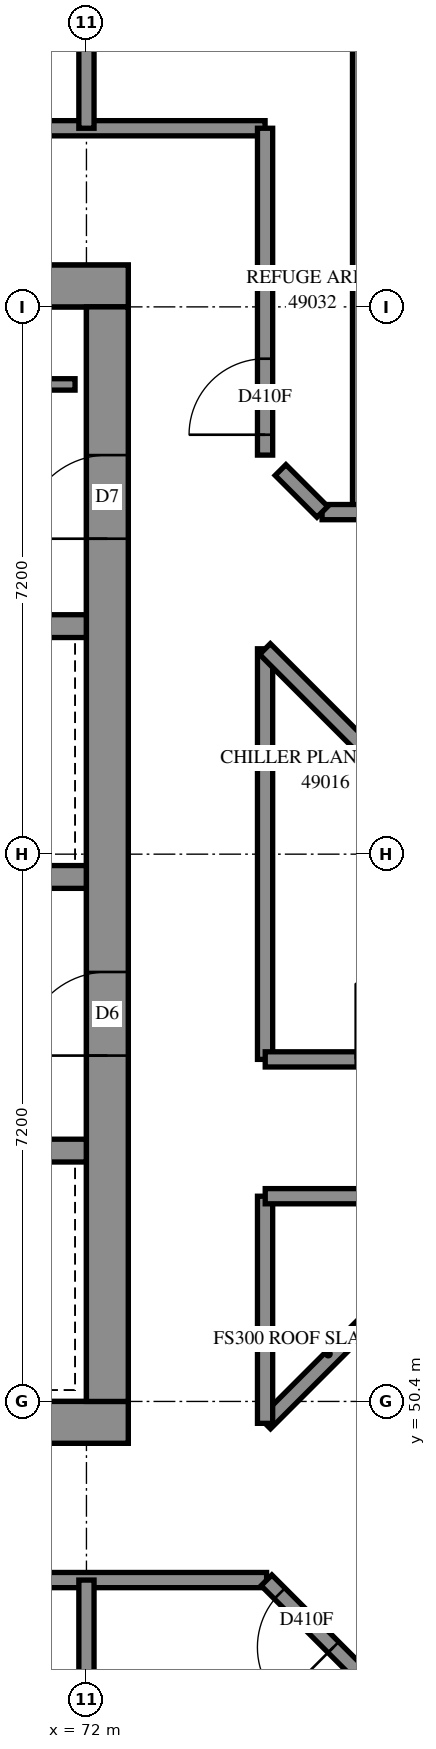
"""IFC4 building model, lengths in metres.
Left out: names, types, materials, properties, quantities, classifications, styles, units other than length and angle.
Written with IfcOpenShell. Run it as: python <this file> out.ifc"""

import sys

from ifc_helpers import new_model, si_unit, direction, frame, frame_2d, origin, place, context, subcontext, project, spatial, rectangle, extrude, element, fill, save


model = new_model("IFC4")
c1 = context("Model", 3, precision=1e-05, world=origin(), true_north=direction((0.0, 1.0)))
c2 = subcontext(c1, "Body", "Model", "MODEL_VIEW")
j1 = project(units=[si_unit("LENGTHUNIT", "METRE"), si_unit("PLANEANGLEUNIT", "RADIAN")], contexts=[c1])
p1 = place(None, origin())
s1 = spatial("IfcSite", under=j1, at=p1, CompositionType="ELEMENT")
p2 = place(p1, origin())
s2 = spatial("IfcBuilding", under=s1, at=p2, CompositionType="ELEMENT")
p3 = place(p2, frame((0.0, 0.0, 180.4)))
s3 = spatial("IfcBuildingStorey", under=s2, at=p3, CompositionType="ELEMENT", Elevation=180.4)
p4 = place(p3, frame((57.05, 50.125, -0.3), z_axis=(0.0, 0.0, 1.0), x_axis=(1.0, 0.0, 0.0)))
e1 = element("IfcWall", 1, at=p4, inside=s3, PredefinedType="SHEAR", context=c2, shape_type="SweptSolid", body=[
    extrude(rectangle(XDim=15.5, YDim=0.55, at=frame_2d((7.75, 0.0))), origin(), (0.0, 0.0, 1.0), 4.3),
])
p5 = place(p3, frame((57.05, 65.075, -0.3), z_axis=(0.0, 0.0, 1.0), x_axis=(1.0, 0.0, 0.0)))
e2 = element("IfcWall", 2, at=p5, inside=s3, PredefinedType="SHEAR", context=c2, shape_type="SweptSolid", body=[
    extrude(rectangle(XDim=15.5, YDim=0.55, at=frame_2d((7.75, 0.0))), origin(), (0.0, 0.0, 1.0), 4.3),
])
p6 = place(p5, frame((10.55, 0.0, 0.3)))
e3 = element("IfcOpeningElement", 3, at=p6, cuts=e2, PredefinedType="OPENING", context=c2, shape_type="SweptSolid", body=[
    extrude(rectangle(XDim=0.8, YDim=2.1, at=frame_2d((0.4, 1.05))), frame((0.0, 0.285, 0.0), z_axis=(0.0, -1.0, 0.0), x_axis=(1.0, 0.0, 0.0)), (0.0, 0.0, 1.0), 0.57),
])
p7 = place(p3, frame((72.275, 50.4, -0.3), z_axis=(0.0, 0.0, 1.0), x_axis=(0.0, 1.0, 0.0)))
e4 = element("IfcWall", 4, at=p7, inside=s3, PredefinedType="SHEAR", context=c2, shape_type="SweptSolid", body=[
    extrude(rectangle(XDim=14.4, YDim=0.55, at=frame_2d((7.2, 0.0))), origin(), (0.0, 0.0, 1.0), 4.3),
])
p8 = place(p7, frame((4.55, 0.0, 0.3)))
e5 = element("IfcOpeningElement", 5, at=p8, cuts=e4, PredefinedType="OPENING", context=c2, shape_type="SweptSolid", body=[
    extrude(rectangle(XDim=1.1, YDim=2.1, at=frame_2d((0.55, 1.05))), frame((0.0, 0.285, 0.0), z_axis=(0.0, -1.0, 0.0), x_axis=(1.0, 0.0, 0.0)), (0.0, 0.0, 1.0), 0.57),
])
p9 = place(p7, frame((11.35, 0.0, 0.3)))
e6 = element("IfcOpeningElement", 6, at=p9, cuts=e4, PredefinedType="OPENING", context=c2, shape_type="SweptSolid", body=[
    extrude(rectangle(XDim=1.1, YDim=2.1, at=frame_2d((0.55, 1.05))), frame((0.0, 0.285, 0.0), z_axis=(0.0, -1.0, 0.0), x_axis=(1.0, 0.0, 0.0)), (0.0, 0.0, 1.0), 0.57),
])
p10 = place(p3, frame((57.6, 53.7, 0.0), z_axis=(0.0, 0.0, 1.0), x_axis=(1.0, 0.0, 0.0)))
e7 = element("IfcWall", 7, at=p10, inside=s3, PredefinedType="SOLIDWALL", context=c2, shape_type="SweptSolid", body=[
    extrude(rectangle(XDim=14.4, YDim=0.3, at=frame_2d((7.2, 0.0))), origin(), (0.0, 0.0, 1.0), 4.7),
])
p11 = place(p10, frame((1.35, 0.0, 0.0)))
e8 = element("IfcOpeningElement", 8, at=p11, cuts=e7, PredefinedType="OPENING", context=c2, shape_type="SweptSolid", body=[
    extrude(rectangle(XDim=0.9, YDim=2.1, at=frame_2d((0.45, 1.05))), frame((0.0, 0.16, 0.0), z_axis=(0.0, -1.0, 0.0), x_axis=(1.0, 0.0, 0.0)), (0.0, 0.0, 1.0), 0.32),
])
p12 = place(p10, frame((4.95, 0.0, 0.0)))
e9 = element("IfcOpeningElement", 9, at=p12, cuts=e7, PredefinedType="OPENING", context=c2, shape_type="SweptSolid", body=[
    extrude(rectangle(XDim=0.9, YDim=2.1, at=frame_2d((0.45, 1.05))), frame((0.0, 0.16, 0.0), z_axis=(0.0, -1.0, 0.0), x_axis=(1.0, 0.0, 0.0)), (0.0, 0.0, 1.0), 0.32),
])
p13 = place(p10, frame((8.55, 0.0, 0.0)))
e10 = element("IfcOpeningElement", 10, at=p13, cuts=e7, PredefinedType="OPENING", context=c2, shape_type="SweptSolid", body=[
    extrude(rectangle(XDim=0.9, YDim=2.1, at=frame_2d((0.45, 1.05))), frame((0.0, 0.16, 0.0), z_axis=(0.0, -1.0, 0.0), x_axis=(1.0, 0.0, 0.0)), (0.0, 0.0, 1.0), 0.32),
])
p14 = place(p10, frame((12.05, 0.0, 0.0)))
e11 = element("IfcOpeningElement", 11, at=p14, cuts=e7, PredefinedType="OPENING", context=c2, shape_type="SweptSolid", body=[
    extrude(rectangle(XDim=1.1, YDim=2.1, at=frame_2d((0.55, 1.05))), frame((0.0, 0.16, 0.0), z_axis=(0.0, -1.0, 0.0), x_axis=(1.0, 0.0, 0.0)), (0.0, 0.0, 1.0), 0.32),
])
p15 = place(p3, frame((57.6, 57.3, 0.0), z_axis=(0.0, 0.0, 1.0), x_axis=(1.0, 0.0, 0.0)))
e12 = element("IfcWall", 12, at=p15, inside=s3, PredefinedType="SOLIDWALL", context=c2, shape_type="SweptSolid", body=[
    extrude(rectangle(XDim=14.4, YDim=0.3, at=frame_2d((7.2, 0.0))), origin(), (0.0, 0.0, 1.0), 4.7),
])
p16 = place(p15, frame((1.25, 0.0, 0.0)))
e13 = element("IfcOpeningElement", 13, at=p16, cuts=e12, PredefinedType="OPENING", context=c2, shape_type="SweptSolid", body=[
    extrude(rectangle(XDim=1.1, YDim=2.1, at=frame_2d((0.55, 1.05))), frame((0.0, 0.16, 0.0), z_axis=(0.0, -1.0, 0.0), x_axis=(1.0, 0.0, 0.0)), (0.0, 0.0, 1.0), 0.32),
])
p17 = place(p15, frame((4.85, 0.0, 0.0)))
e14 = element("IfcOpeningElement", 14, at=p17, cuts=e12, PredefinedType="OPENING", context=c2, shape_type="SweptSolid", body=[
    extrude(rectangle(XDim=1.1, YDim=2.1, at=frame_2d((0.55, 1.05))), frame((0.0, 0.16, 0.0), z_axis=(0.0, -1.0, 0.0), x_axis=(1.0, 0.0, 0.0)), (0.0, 0.0, 1.0), 0.32),
])
p18 = place(p15, frame((8.45, 0.0, 0.0)))
e15 = element("IfcOpeningElement", 15, at=p18, cuts=e12, PredefinedType="OPENING", context=c2, shape_type="SweptSolid", body=[
    extrude(rectangle(XDim=1.1, YDim=2.1, at=frame_2d((0.55, 1.05))), frame((0.0, 0.16, 0.0), z_axis=(0.0, -1.0, 0.0), x_axis=(1.0, 0.0, 0.0)), (0.0, 0.0, 1.0), 0.32),
])
p19 = place(p15, frame((12.05, 0.0, 0.0)))
e16 = element("IfcOpeningElement", 16, at=p19, cuts=e12, PredefinedType="OPENING", context=c2, shape_type="SweptSolid", body=[
    extrude(rectangle(XDim=1.1, YDim=2.1, at=frame_2d((0.55, 1.05))), frame((0.0, 0.16, 0.0), z_axis=(0.0, -1.0, 0.0), x_axis=(1.0, 0.0, 0.0)), (0.0, 0.0, 1.0), 0.32),
])
p20 = place(p3, frame((64.8, 60.6, 0.0), z_axis=(0.0, 0.0, 1.0), x_axis=(1.0, 0.0, 0.0)))
e17 = element("IfcWall", 17, at=p20, inside=s3, PredefinedType="SOLIDWALL", context=c2, shape_type="SweptSolid", body=[
    extrude(rectangle(XDim=7.2, YDim=0.3, at=frame_2d((3.6, 0.0))), origin(), (0.0, 0.0, 1.0), 4.7),
])
p21 = place(p3, frame((64.95, 63.78, 0.0), z_axis=(0.0, 0.0, 1.0), x_axis=(1.0, 0.0, 0.0)))
e18 = element("IfcWall", 18, at=p21, inside=s3, PredefinedType="PARTITIONING", context=c2, shape_type="SweptSolid", body=[
    extrude(rectangle(XDim=6.9, YDim=0.15, at=frame_2d((3.45, 0.0))), origin(), (0.0, 0.0, 1.0), 4.7),
])
p22 = place(p3, frame((55.25, 48.05, 0.0), z_axis=(0.0, 0.0, 1.0), x_axis=(1.0, 0.0, 0.0)))
e19 = element("IfcWall", 19, at=p22, inside=s3, PredefinedType="PARTITIONING", context=c2, shape_type="SweptSolid", body=[
    extrude(rectangle(XDim=19.12, YDim=0.2, at=frame_2d((9.56, 0.0))), origin(), (0.0, 0.0, 1.0), 4.7),
])
p23 = place(p22, frame((4.383, 0.0, 0.0)))
e20 = element("IfcOpeningElement", 20, at=p23, cuts=e19, PredefinedType="OPENING", context=c2, shape_type="SweptSolid", body=[
    extrude(rectangle(XDim=1.0, YDim=2.1, at=frame_2d((0.5, 1.05))), frame((0.0, 0.11, 0.0), z_axis=(0.0, -1.0, 0.0), x_axis=(1.0, 0.0, 0.0)), (0.0, 0.0, 1.0), 0.22),
])
p24 = place(p22, frame((6.457, 0.0, 0.0)))
e21 = element("IfcOpeningElement", 21, at=p24, cuts=e19, PredefinedType="OPENING", context=c2, shape_type="SweptSolid", body=[
    extrude(rectangle(XDim=1.0, YDim=2.1, at=frame_2d((0.5, 1.05))), frame((0.0, 0.11, 0.0), z_axis=(0.0, -1.0, 0.0), x_axis=(1.0, 0.0, 0.0)), (0.0, 0.0, 1.0), 0.22),
])
p25 = place(p22, frame((11.582, 0.0, 0.0)))
e22 = element("IfcOpeningElement", 22, at=p25, cuts=e19, PredefinedType="OPENING", context=c2, shape_type="SweptSolid", body=[
    extrude(rectangle(XDim=1.0, YDim=2.1, at=frame_2d((0.5, 1.05))), frame((0.0, 0.11, 0.0), z_axis=(0.0, -1.0, 0.0), x_axis=(1.0, 0.0, 0.0)), (0.0, 0.0, 1.0), 0.22),
])
p26 = place(p22, frame((13.658, 0.0, 0.0)))
e23 = element("IfcOpeningElement", 23, at=p26, cuts=e19, PredefinedType="OPENING", context=c2, shape_type="SweptSolid", body=[
    extrude(rectangle(XDim=1.0, YDim=2.1, at=frame_2d((0.5, 1.05))), frame((0.0, 0.11, 0.0), z_axis=(0.0, -1.0, 0.0), x_axis=(1.0, 0.0, 0.0)), (0.0, 0.0, 1.0), 0.22),
])
p27 = place(p3, frame((55.25, 67.15, 0.0), z_axis=(0.0, 0.0, 1.0), x_axis=(1.0, 0.0, 0.0)))
e24 = element("IfcWall", 24, at=p27, inside=s3, PredefinedType="PARTITIONING", context=c2, shape_type="SweptSolid", body=[
    extrude(rectangle(XDim=19.1, YDim=0.2, at=frame_2d((9.55, 0.0))), origin(), (0.0, 0.0, 1.0), 4.7),
])
p28 = place(p27, frame((4.442, 0.0, 0.0)))
e25 = element("IfcOpeningElement", 25, at=p28, cuts=e24, PredefinedType="OPENING", context=c2, shape_type="SweptSolid", body=[
    extrude(rectangle(XDim=1.0, YDim=2.1, at=frame_2d((0.5, 1.05))), frame((0.0, 0.11, 0.0), z_axis=(0.0, -1.0, 0.0), x_axis=(1.0, 0.0, 0.0)), (0.0, 0.0, 1.0), 0.22),
])
p29 = place(p27, frame((6.518, 0.0, 0.0)))
e26 = element("IfcOpeningElement", 26, at=p29, cuts=e24, PredefinedType="OPENING", context=c2, shape_type="SweptSolid", body=[
    extrude(rectangle(XDim=1.0, YDim=2.1, at=frame_2d((0.5, 1.05))), frame((0.0, 0.11, 0.0), z_axis=(0.0, -1.0, 0.0), x_axis=(1.0, 0.0, 0.0)), (0.0, 0.0, 1.0), 0.22),
])
p30 = place(p27, frame((11.643, 0.0, 0.0)))
e27 = element("IfcOpeningElement", 27, at=p30, cuts=e24, PredefinedType="OPENING", context=c2, shape_type="SweptSolid", body=[
    extrude(rectangle(XDim=1.0, YDim=2.1, at=frame_2d((0.5, 1.05))), frame((0.0, 0.11, 0.0), z_axis=(0.0, -1.0, 0.0), x_axis=(1.0, 0.0, 0.0)), (0.0, 0.0, 1.0), 0.22),
])
p31 = place(p27, frame((13.717, 0.0, 0.0)))
e28 = element("IfcOpeningElement", 28, at=p31, cuts=e24, PredefinedType="OPENING", context=c2, shape_type="SweptSolid", body=[
    extrude(rectangle(XDim=1.0, YDim=2.1, at=frame_2d((0.5, 1.05))), frame((0.0, 0.11, 0.0), z_axis=(0.0, -1.0, 0.0), x_axis=(1.0, 0.0, 0.0)), (0.0, 0.0, 1.0), 0.22),
])
p32 = place(p3, frame((75.6, 62.1, 0.0), z_axis=(0.0, 0.0, 1.0), x_axis=(0.0, 1.0, 0.0)))
e29 = element("IfcWall", 29, at=p32, inside=s3, PredefinedType="PARTITIONING", context=c2, shape_type="SweptSolid", body=[
    extrude(rectangle(XDim=7.55, YDim=0.2, at=frame_2d((3.775, 0.0))), origin(), (0.0, 0.0, 1.0), 4.7),
])
p33 = place(p3, frame((74.35, 54.9, 0.0), z_axis=(0.0, 0.0, 1.0), x_axis=(0.0, 1.0, 0.0)))
e30 = element("IfcWall", 30, at=p33, inside=s3, PredefinedType="PARTITIONING", context=c2, shape_type="SweptSolid", body=[
    extrude(rectangle(XDim=5.402, YDim=0.2, at=frame_2d((2.701, 0.0))), origin(), (0.0, 0.0, 1.0), 4.7),
])
p34 = place(p3, frame((74.352, 54.9, 0.0), z_axis=(0.0, 0.0, 1.0), x_axis=(1.0, 0.0, 0.0)))
e31 = element("IfcWall", 31, at=p34, inside=s3, PredefinedType="PARTITIONING", context=c2, shape_type="SweptSolid", body=[
    extrude(rectangle(XDim=4.788, YDim=0.2, at=frame_2d((2.394, 0.0))), origin(), (0.0, 0.0, 1.0), 4.7),
])
p35 = place(p34, frame((1.19, 0.0, 0.0)))
e32 = element("IfcOpeningElement", 32, at=p35, cuts=e31, PredefinedType="OPENING", context=c2, shape_type="SweptSolid", body=[
    extrude(rectangle(XDim=1.0, YDim=2.1, at=frame_2d((0.5, 1.05))), frame((0.0, 0.11, 0.0), z_axis=(0.0, -1.0, 0.0), x_axis=(1.0, 0.0, 0.0)), (0.0, 0.0, 1.0), 0.22),
])
p36 = place(p3, frame((74.349, 60.299, 0.0), z_axis=(0.0, 0.0, 1.0), x_axis=(0.7071067812, -0.7071067812, 0.0)))
e33 = element("IfcWall", 33, at=p36, inside=s3, PredefinedType="PARTITIONING", context=c2, shape_type="SweptSolid", body=[
    extrude(rectangle(XDim=4.452, YDim=0.2, at=frame_2d((2.226, 0.0))), origin(), (0.0, 0.0, 1.0), 4.7),
])
p37 = place(p3, frame((74.35, 62.85, 0.0), z_axis=(0.0, 0.0, 1.0), x_axis=(0.0, 1.0, 0.0)))
e34 = element("IfcWall", 34, at=p37, inside=s3, PredefinedType="PARTITIONING", context=c2, shape_type="SweptSolid", body=[
    extrude(rectangle(XDim=4.3, YDim=0.2, at=frame_2d((2.15, 0.0))), origin(), (0.0, 0.0, 1.0), 4.7),
])
p38 = place(p37, frame((0.268, 0.0, 0.0)))
e35 = element("IfcOpeningElement", 35, at=p38, cuts=e34, PredefinedType="OPENING", context=c2, shape_type="SweptSolid", body=[
    extrude(rectangle(XDim=1.0, YDim=2.1, at=frame_2d((0.5, 1.05))), frame((0.0, 0.11, 0.0), z_axis=(0.0, -1.0, 0.0), x_axis=(1.0, 0.0, 0.0)), (0.0, 0.0, 1.0), 0.22),
])
p39 = place(p3, frame((74.351, 50.111, 0.0), z_axis=(0.0, 0.0, 1.0), x_axis=(0.7071067812, 0.7071067812, 0.0)))
e36 = element("IfcWall", 36, at=p39, inside=s3, PredefinedType="PARTITIONING", context=c2, shape_type="SweptSolid", body=[
    extrude(rectangle(XDim=4.226, YDim=0.2, at=frame_2d((2.113, 0.0))), origin(), (0.0, 0.0, 1.0), 4.7),
])
p40 = place(p3, frame((75.1, 62.1, 0.0), z_axis=(0.0, 0.0, 1.0), x_axis=(1.0, 0.0, 0.0)))
e37 = element("IfcWall", 37, at=p40, inside=s3, PredefinedType="PARTITIONING", context=c2, shape_type="SweptSolid", body=[
    extrude(rectangle(XDim=4.1, YDim=0.2, at=frame_2d((2.05, 0.0))), origin(), (0.0, 0.0, 1.0), 4.7),
])
p41 = place(p3, frame((76.864, 45.55, 0.0), z_axis=(0.0, 0.0, 1.0), x_axis=(-0.7069226259, 0.7072908885, 0.0)))
e38 = element("IfcWall", 38, at=p41, inside=s3, PredefinedType="PARTITIONING", context=c2, shape_type="SweptSolid", body=[
    extrude(rectangle(XDim=3.53, YDim=0.2, at=frame_2d((1.765, 0.0))), origin(), (0.0, 0.0, 1.0), 4.7),
])
p42 = place(p41, frame((2.285, 0.0, 0.0)))
e39 = element("IfcOpeningElement", 39, at=p42, cuts=e38, PredefinedType="OPENING", context=c2, shape_type="SweptSolid", body=[
    extrude(rectangle(XDim=1.0, YDim=2.1, at=frame_2d((0.5, 1.05))), frame((0.0, 0.11, 0.0), z_axis=(0.0, -1.0, 0.0), x_axis=(1.0, 0.0, 0.0)), (0.0, 0.0, 1.0), 0.22),
])
p43 = place(p3, frame((74.35, 50.112, 0.0), z_axis=(0.0, 0.0, 1.0), x_axis=(0.0, 1.0, 0.0)))
e40 = element("IfcWall", 40, at=p43, inside=s3, PredefinedType="PARTITIONING", context=c2, shape_type="SweptSolid", body=[
    extrude(rectangle(XDim=2.988, YDim=0.2, at=frame_2d((1.494, 0.0))), origin(), (0.0, 0.0, 1.0), 4.7),
])
p44 = place(p3, frame((74.352, 53.1, 0.0), z_axis=(0.0, 0.0, 1.0), x_axis=(1.0, 0.0, 0.0)))
e41 = element("IfcWall", 41, at=p44, inside=s3, PredefinedType="PARTITIONING", context=c2, shape_type="SweptSolid", body=[
    extrude(rectangle(XDim=2.986, YDim=0.2, at=frame_2d((1.493, 0.0))), origin(), (0.0, 0.0, 1.0), 4.7),
])
for number, where, z_axis, x_axis in (
    (42, (72.0, 45.55, 0.0), (0.0, 0.0, 1.0), (0.0, 1.0, 0.0)),
    (43, (72.0, 67.15, 0.0), (0.0, 0.0, 1.0), (0.0, 1.0, 0.0)),
):
    element("IfcWall", number, at=place(p3, frame(where, z_axis=z_axis, x_axis=x_axis)), inside=s3, PredefinedType="PARTITIONING", context=c2, shape_type="SweptSolid", body=[
        extrude(rectangle(XDim=2.5, YDim=0.2, at=frame_2d((1.25, 0.0))), origin(), (0.0, 0.0, 1.0), 4.7),
    ])
p45 = place(p3, frame((74.553, 62.654, 0.0), z_axis=(0.0, 0.0, 1.0), x_axis=(0.7071067812, -0.7071067812, 0.0)))
e44 = element("IfcWall", 44, at=p45, inside=s3, PredefinedType="PARTITIONING", context=c2, shape_type="SweptSolid", body=[
    extrude(rectangle(XDim=0.778, YDim=0.2, at=frame_2d((0.389, 0.0))), origin(), (0.0, 0.0, 1.0), 4.7),
])
p46 = place(p8, origin())
e45 = element("IfcDoor", 45, at=p46, inside=s3, OperationType="DOUBLE_DOOR_SINGLE_SWING", PredefinedType="DOOR", context=c2, shape_type="SweptSolid", body=[
    extrude(rectangle(XDim=1.1, YDim=2.1, at=frame_2d((0.55, 1.05))), frame((0.0, 0.025, 0.0), z_axis=(0.0, -1.0, 0.0), x_axis=(1.0, 0.0, 0.0)), (0.0, 0.0, 1.0), 0.05),
])
fill(e5, e45)
p47 = place(p9, origin())
e46 = element("IfcDoor", 46, at=p47, inside=s3, OperationType="SINGLE_SWING_RIGHT", PredefinedType="DOOR", context=c2, shape_type="SweptSolid", body=[
    extrude(rectangle(XDim=1.1, YDim=2.1, at=frame_2d((0.55, 1.05))), frame((0.0, 0.025, 0.0), z_axis=(0.0, -1.0, 0.0), x_axis=(1.0, 0.0, 0.0)), (0.0, 0.0, 1.0), 0.05),
])
fill(e6, e46)
p48 = place(p35, origin())
e47 = element("IfcDoor", 47, at=p48, inside=s3, OperationType="SINGLE_SWING_LEFT", PredefinedType="DOOR", context=c2, shape_type="SweptSolid", body=[
    extrude(rectangle(XDim=1.0, YDim=2.1, at=frame_2d((0.5, 1.05))), frame((0.0, 0.025, 0.0), z_axis=(0.0, -1.0, 0.0), x_axis=(1.0, 0.0, 0.0)), (0.0, 0.0, 1.0), 0.05),
])
fill(e32, e47)
p49 = place(p42, origin())
e48 = element("IfcDoor", 48, at=p49, inside=s3, OperationType="SINGLE_SWING_LEFT", PredefinedType="DOOR", context=c2, shape_type="SweptSolid", body=[
    extrude(rectangle(XDim=1.0, YDim=2.1, at=frame_2d((0.5, 1.05))), frame((0.0, 0.025, 0.0), z_axis=(0.0, -1.0, 0.0), x_axis=(1.0, 0.0, 0.0)), (0.0, 0.0, 1.0), 0.05),
])
fill(e39, e48)
p50 = place(p38, origin())
e49 = element("IfcDoor", 49, at=p50, inside=s3, OperationType="SINGLE_SWING_RIGHT", PredefinedType="DOOR", context=c2, shape_type="SweptSolid", body=[
    extrude(rectangle(XDim=1.0, YDim=2.1, at=frame_2d((0.5, 1.05))), frame((0.0, 0.025, 0.0), z_axis=(0.0, -1.0, 0.0), x_axis=(1.0, 0.0, 0.0)), (0.0, 0.0, 1.0), 0.05),
])
fill(e35, e49)
save(model, sys.argv[1])
